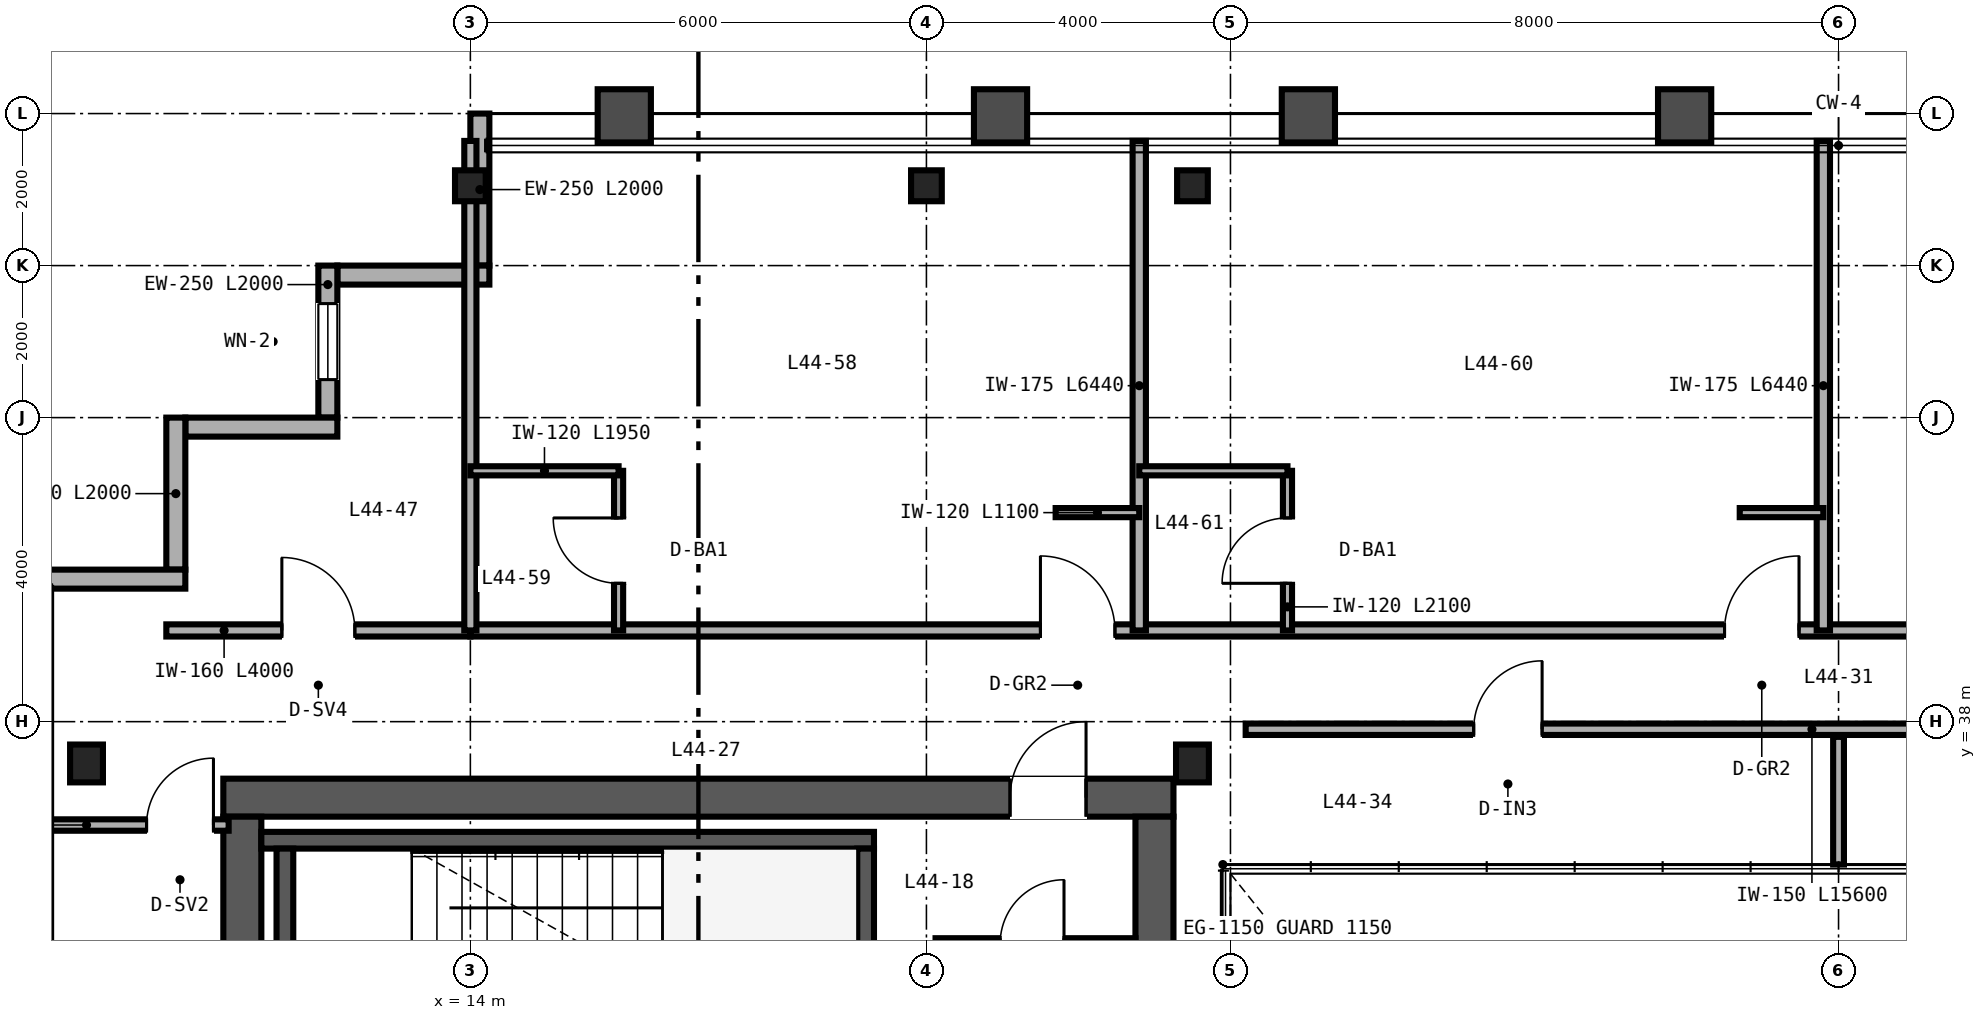
"""IFC4 building model, lengths in metres.
Left out: names, types, materials, properties, quantities, classifications, styles, units other than length and angle.
Written with IfcOpenShell. Run it as: python <this file> out.ifc"""

import sys

from ifc_helpers import new_model, si_unit, direction, frame, frame_2d, origin, origin_2d, place, context, subcontext, project, spatial, rectangle, i_section, extrude, source, transform, mapped, element, fill, save


model = new_model("IFC4")
c1 = context("Model", 3, precision=1e-05, world=origin(), true_north=direction((0.0, 1.0)))
c2 = subcontext(c1, "Body", "Model", "MODEL_VIEW")
j1 = project(units=[si_unit("LENGTHUNIT", "METRE"), si_unit("PLANEANGLEUNIT", "RADIAN")], contexts=[c1])
p1 = place(None, origin())
s1 = spatial("IfcSite", under=j1, at=p1, CompositionType="ELEMENT")
p2 = place(p1, origin())
s2 = spatial("IfcBuilding", under=s1, at=p2, CompositionType="ELEMENT")
p3 = place(p2, frame((0.0, 0.0, 177.6)))
s3 = spatial("IfcBuildingStorey", under=s2, at=p3, CompositionType="ELEMENT", Elevation=177.6)
p4 = place(p3, frame((10.75, 37.0, 0.0), z_axis=(0.0, 0.0, 1.0), x_axis=(1.0, 0.0, 0.0)))
e1 = element("IfcWall", 1, at=p4, inside=s3, PredefinedType="SHEAR", context=c2, shape_type="SweptSolid", body=[
    extrude(rectangle(XDim=12.5, YDim=0.5, at=frame_2d((6.25, 0.0))), origin(), (0.0, 0.0, 1.0), 3.37),
])
p5 = place(p4, frame((10.35, 0.0, 0.0)))
e2 = element("IfcOpeningElement", 2, at=p5, cuts=e1, PredefinedType="OPENING", context=c2, shape_type="SweptSolid", body=[
    extrude(rectangle(XDim=1.0, YDim=2.15, at=frame_2d((0.5, 1.075))), frame((0.0, 0.26, 0.0), z_axis=(0.0, -1.0, 0.0), x_axis=(1.0, 0.0, 0.0)), (0.0, 0.0, 1.0), 0.52),
])
for number, where, z_axis, x_axis in (
    (3, (11.0, 15.25, 0.0), (0.0, 0.0, 1.0), (0.0, 1.0, 0.0)),
    (4, (23.0, 15.25, 0.0), (0.0, 0.0, 1.0), (0.0, 1.0, 0.0)),
):
    element("IfcWall", number, at=place(p3, frame(where, z_axis=z_axis, x_axis=x_axis)), inside=s3, PredefinedType="SHEAR", context=c2, shape_type="SweptSolid", body=[
        extrude(rectangle(XDim=21.5, YDim=0.5, at=frame_2d((10.75, 0.0))), origin(), (0.0, 0.0, 1.0), 3.37),
    ])
p6 = place(p3, frame((11.25, 36.44, 0.0), z_axis=(0.0, 0.0, 1.0), x_axis=(1.0, 0.0, 0.0)))
e5 = element("IfcWall", 5, at=p6, inside=s3, PredefinedType="SHEAR", context=c2, shape_type="SweptSolid", body=[
    extrude(rectangle(XDim=8.06, YDim=0.22, at=frame_2d((4.03, 0.0))), origin(), (0.0, 0.0, 1.0), 3.4),
])
for number, where, z_axis, x_axis in (
    (6, (11.56, 33.05, 0.0), (0.0, 0.0, 1.0), (0.0, 1.0, 0.0)),
    (7, (19.2, 33.05, 0.0), (0.0, 0.0, 1.0), (0.0, 1.0, 0.0)),
):
    element("IfcWall", number, at=place(p3, frame(where, z_axis=z_axis, x_axis=x_axis)), inside=s3, PredefinedType="SHEAR", context=c2, shape_type="SweptSolid", body=[
        extrude(rectangle(XDim=3.28, YDim=0.22, at=frame_2d((1.64, 0.0))), origin(), (0.0, 0.0, 1.0), 3.4),
    ])
m1 = source(origin(), c2, "Body", "SweptSolid", [
    extrude(i_section(OverallWidth=0.432, OverallDepth=0.498, WebThickness=0.056, FlangeThickness=0.089, FilletRadius=0.025, at=origin_2d()), origin(), (0.0, 0.0, 1.0), 3.37),
])
for number, where, z_axis, x_axis in (
    (8, (8.95, 37.45, 0.0), (0.0, 0.0, 1.0), (1.0, 0.0, 0.0)),
    (9, (23.5, 37.45, 0.0), (0.0, 0.0, 1.0), (1.0, 0.0, 0.0)),
):
    element("IfcColumn", number, at=place(p3, frame(where, z_axis=z_axis, x_axis=x_axis)), inside=s3, PredefinedType="COLUMN", context=c2, shape_type="MappedRepresentation", body=[
        mapped(m1, transform((0.0, 0.0, 0.0), scale=1.0)),
    ])
m2 = source(origin(), c2, "Body", "SweptSolid", [
    extrude(i_section(OverallWidth=0.404, OverallDepth=0.407, WebThickness=0.027, FlangeThickness=0.044, FilletRadius=0.025, at=origin_2d()), origin(), (0.0, 0.0, 1.0), 3.37),
])
for number, where, z_axis, x_axis in (
    (10, (14.0, 45.05, 0.0), (0.0, 0.0, 1.0), (1.0, 0.0, 0.0)),
    (11, (20.0, 45.05, 0.0), (0.0, 0.0, 1.0), (1.0, 0.0, 0.0)),
    (12, (23.5, 45.05, 0.0), (0.0, 0.0, 1.0), (1.0, 0.0, 0.0)),
):
    element("IfcColumn", number, at=place(p3, frame(where, z_axis=z_axis, x_axis=x_axis)), inside=s3, PredefinedType="COLUMN", context=c2, shape_type="MappedRepresentation", body=[
        mapped(m2, transform((0.0, 0.0, 0.0), scale=1.0)),
    ])
p7 = place(p3, frame((14.125, 46.0, 0.0), z_axis=(0.0, 0.0, 1.0), x_axis=(0.0, -1.0, 0.0)))
e13 = element("IfcWall", 13, at=p7, inside=s3, PredefinedType="SOLIDWALL", context=c2, shape_type="SweptSolid", body=[
    extrude(rectangle(XDim=2.0, YDim=0.25, at=frame_2d((1.0, 0.0))), origin(), (0.0, 0.0, 1.0), 2.677),
])
p8 = place(p3, frame((14.25, 43.875, 0.0), z_axis=(0.0, 0.0, 1.0), x_axis=(-1.0, 0.0, 0.0)))
e14 = element("IfcWall", 14, at=p8, inside=s3, PredefinedType="SOLIDWALL", context=c2, shape_type="SweptSolid", body=[
    extrude(rectangle(XDim=2.0, YDim=0.25, at=frame_2d((1.0, 0.0))), origin(), (0.0, 0.0, 1.0), 3.37),
])
p9 = place(p3, frame((12.125, 44.0, 0.0), z_axis=(0.0, 0.0, 1.0), x_axis=(0.0, -1.0, 0.0)))
e15 = element("IfcWall", 15, at=p9, inside=s3, PredefinedType="SOLIDWALL", context=c2, shape_type="SweptSolid", body=[
    extrude(rectangle(XDim=2.0, YDim=0.25, at=frame_2d((1.0, 0.0))), origin(), (0.0, 0.0, 1.0), 3.37),
])
p10 = place(p9, frame((0.5, 0.0, 0.85)))
e16 = element("IfcOpeningElement", 16, at=p10, cuts=e15, PredefinedType="OPENING", context=c2, shape_type="SweptSolid", body=[
    extrude(rectangle(XDim=1.0, YDim=1.9, at=frame_2d((0.5, 0.95))), frame((0.0, 0.135, 0.0), z_axis=(0.0, -1.0, 0.0), x_axis=(1.0, 0.0, 0.0)), (0.0, 0.0, 1.0), 0.27),
])
for number, where, z_axis, x_axis in (
    (17, (12.25, 41.875, 0.0), (0.0, 0.0, 1.0), (-1.0, 0.0, 0.0)),
    (18, (10.125, 42.0, 0.0), (0.0, 0.0, 1.0), (0.0, -1.0, 0.0)),
):
    element("IfcWall", number, at=place(p3, frame(where, z_axis=z_axis, x_axis=x_axis)), inside=s3, PredefinedType="SOLIDWALL", context=c2, shape_type="SweptSolid", body=[
        extrude(rectangle(XDim=2.0, YDim=0.25, at=frame_2d((1.0, 0.0))), origin(), (0.0, 0.0, 1.0), 3.37),
    ])
p11 = place(p3, frame((10.25, 39.875, 0.0), z_axis=(0.0, 0.0, 1.0), x_axis=(-1.0, 0.0, 0.0)))
e19 = element("IfcWall", 19, at=p11, inside=s3, PredefinedType="SOLIDWALL", context=c2, shape_type="SweptSolid", body=[
    extrude(rectangle(XDim=2.25, YDim=0.25, at=frame_2d((1.125, 0.0))), origin(), (0.0, 0.0, 1.0), 3.37),
])
p12 = place(p3, frame((20.12, 35.08, 0.0), z_axis=(0.0, 0.0, 1.0), x_axis=(1.0, 0.0, 0.0)))
e20 = element("IfcWall", 20, at=p12, inside=s3, PredefinedType="PARTITIONING", context=c2, shape_type="SweptSolid", body=[
    extrude(rectangle(XDim=2.63, YDim=0.142, at=frame_2d((1.315, 0.0))), origin(), (0.0, 0.0, 1.0), 3.37),
])
p13 = place(p12, frame((0.85, 0.0, 0.0)))
e21 = element("IfcOpeningElement", 21, at=p13, cuts=e20, PredefinedType="OPENING", context=c2, shape_type="SweptSolid", body=[
    extrude(rectangle(XDim=0.84, YDim=2.1, at=frame_2d((0.42, 1.05))), frame((0.0, 0.081, 0.0), z_axis=(0.0, -1.0, 0.0), x_axis=(1.0, 0.0, 0.0)), (0.0, 0.0, 1.0), 0.162),
])
p14 = place(p3, frame((24.2, 37.9, 0.0), z_axis=(0.0, 0.0, 1.0), x_axis=(1.0, 0.0, 0.0)))
e22 = element("IfcWall", 22, at=p14, inside=s3, PredefinedType="PARTITIONING", context=c2, shape_type="SweptSolid", body=[
    extrude(rectangle(XDim=15.6, YDim=0.15, at=frame_2d((7.8, 0.0))), origin(), (0.0, 0.0, 1.0), 3.37),
])
p15 = place(p14, frame((3.0, 0.0, 0.0)))
e23 = element("IfcOpeningElement", 23, at=p15, cuts=e22, PredefinedType="OPENING", context=c2, shape_type="SweptSolid", body=[
    extrude(rectangle(XDim=0.9, YDim=2.15, at=frame_2d((0.45, 1.075))), frame((0.0, 0.085, 0.0), z_axis=(0.0, -1.0, 0.0), x_axis=(1.0, 0.0, 0.0)), (0.0, 0.0, 1.0), 0.17),
])
p16 = place(p14, frame((11.0, 0.0, 0.0)))
e24 = element("IfcOpeningElement", 24, at=p16, cuts=e22, PredefinedType="OPENING", context=c2, shape_type="SweptSolid", body=[
    extrude(rectangle(XDim=0.9, YDim=2.15, at=frame_2d((0.45, 1.075))), frame((0.0, 0.085, 0.0), z_axis=(0.0, -1.0, 0.0), x_axis=(1.0, 0.0, 0.0)), (0.0, 0.0, 1.0), 0.17),
])
p17 = place(p3, frame((32.0, 36.12, 0.0), z_axis=(0.0, 0.0, 1.0), x_axis=(0.0, 1.0, 0.0)))
e25 = element("IfcWall", 25, at=p17, inside=s3, PredefinedType="PARTITIONING", context=c2, shape_type="SweptSolid", body=[
    extrude(rectangle(XDim=1.68, YDim=0.142, at=frame_2d((0.84, 0.0))), origin(), (0.0, 0.0, 1.0), 3.37),
])
p18 = place(p3, frame((8.16, 36.64, 0.0), z_axis=(0.0, 0.0, 1.0), x_axis=(1.0, 0.0, 0.0)))
e26 = element("IfcWall", 26, at=p18, inside=s3, PredefinedType="PARTITIONING", context=c2, shape_type="SweptSolid", body=[
    extrude(rectangle(XDim=2.66, YDim=0.15, at=frame_2d((1.33, 0.0))), origin(), (0.0, 0.0, 1.0), 2.753),
])
p19 = place(p18, frame((1.58, 0.0, 0.0)))
e27 = element("IfcOpeningElement", 27, at=p19, cuts=e26, PredefinedType="OPENING", context=c2, shape_type="SweptSolid", body=[
    extrude(rectangle(XDim=0.88, YDim=2.15, at=frame_2d((0.44, 1.075))), frame((0.0, 0.085, 0.0), z_axis=(0.0, -1.0, 0.0), x_axis=(1.0, 0.0, 0.0)), (0.0, 0.0, 1.0), 0.17),
])
p20 = place(p3, frame((10.0, 39.2, 0.0), z_axis=(0.0, 0.0, 1.0), x_axis=(1.0, 0.0, 0.0)))
e28 = element("IfcWall", 28, at=p20, inside=s3, PredefinedType="PARTITIONING", context=c2, shape_type="SweptSolid", body=[
    extrude(rectangle(XDim=4.0, YDim=0.16, at=frame_2d((2.0, 0.0))), origin(), (0.0, 0.0, 1.0), 3.37),
])
p21 = place(p20, frame((1.52, 0.0, 0.0)))
e29 = element("IfcOpeningElement", 29, at=p21, cuts=e28, PredefinedType="OPENING", context=c2, shape_type="SweptSolid", body=[
    extrude(rectangle(XDim=0.96, YDim=2.15, at=frame_2d((0.48, 1.075))), frame((0.0, 0.09, 0.0), z_axis=(0.0, -1.0, 0.0), x_axis=(1.0, 0.0, 0.0)), (0.0, 0.0, 1.0), 0.18),
])
p22 = place(p3, frame((14.0, 39.2, 0.0), z_axis=(0.0, 0.0, 1.0), x_axis=(1.0, 0.0, 0.0)))
e30 = element("IfcWall", 30, at=p22, inside=s3, PredefinedType="PARTITIONING", context=c2, shape_type="SweptSolid", body=[
    extrude(rectangle(XDim=36.0, YDim=0.16, at=frame_2d((18.0, 0.0))), origin(), (0.0, 0.0, 1.0), 2.913),
])
p23 = place(p22, frame((7.5, 0.0, 0.0)))
e31 = element("IfcOpeningElement", 31, at=p23, cuts=e30, PredefinedType="OPENING", context=c2, shape_type="SweptSolid", body=[
    extrude(rectangle(XDim=0.98, YDim=2.2, at=frame_2d((0.49, 1.1))), frame((0.0, 0.09, 0.0), z_axis=(0.0, -1.0, 0.0), x_axis=(1.0, 0.0, 0.0)), (0.0, 0.0, 1.0), 0.18),
])
p24 = place(p22, frame((16.5, 0.0, 0.0)))
e32 = element("IfcOpeningElement", 32, at=p24, cuts=e30, PredefinedType="OPENING", context=c2, shape_type="SweptSolid", body=[
    extrude(rectangle(XDim=0.98, YDim=2.2, at=frame_2d((0.49, 1.1))), frame((0.0, 0.09, 0.0), z_axis=(0.0, -1.0, 0.0), x_axis=(1.0, 0.0, 0.0)), (0.0, 0.0, 1.0), 0.18),
])
p25 = place(p22, frame((21.82, 0.0, 0.0)))
e33 = element("IfcOpeningElement", 33, at=p25, cuts=e30, PredefinedType="OPENING", context=c2, shape_type="SweptSolid", body=[
    extrude(rectangle(XDim=0.96, YDim=2.15, at=frame_2d((0.48, 1.075))), frame((0.0, 0.09, 0.0), z_axis=(0.0, -1.0, 0.0), x_axis=(1.0, 0.0, 0.0)), (0.0, 0.0, 1.0), 0.18),
])
p26 = place(p22, frame((30.14, 0.0, 0.0)))
e34 = element("IfcOpeningElement", 34, at=p26, cuts=e30, PredefinedType="OPENING", context=c2, shape_type="SweptSolid", body=[
    extrude(rectangle(XDim=0.94, YDim=2.15, at=frame_2d((0.47, 1.075))), frame((0.0, 0.09, 0.0), z_axis=(0.0, -1.0, 0.0), x_axis=(1.0, 0.0, 0.0)), (0.0, 0.0, 1.0), 0.18),
])
p27 = place(p22, frame((34.74, 0.0, 0.0)))
e35 = element("IfcOpeningElement", 35, at=p27, cuts=e30, PredefinedType="OPENING", context=c2, shape_type="SweptSolid", body=[
    extrude(rectangle(XDim=0.94, YDim=2.15, at=frame_2d((0.47, 1.075))), frame((0.0, 0.09, 0.0), z_axis=(0.0, -1.0, 0.0), x_axis=(1.0, 0.0, 0.0)), (0.0, 0.0, 1.0), 0.18),
])
p28 = place(p3, frame((14.0, 39.2, 0.0), z_axis=(0.0, 0.0, 1.0), x_axis=(0.0, 1.0, 0.0)))
e36 = element("IfcWall", 36, at=p28, inside=s3, PredefinedType="PARTITIONING", context=c2, shape_type="SweptSolid", body=[
    extrude(rectangle(XDim=6.44, YDim=0.16, at=frame_2d((3.22, 0.0))), origin(), (0.0, 0.0, 1.0), 2.677),
])
p29 = place(p3, frame((22.8, 39.2, 0.0), z_axis=(0.0, 0.0, 1.0), x_axis=(0.0, 1.0, 0.0)))
e37 = element("IfcWall", 37, at=p29, inside=s3, PredefinedType="PARTITIONING", context=c2, shape_type="SweptSolid", body=[
    extrude(rectangle(XDim=6.44, YDim=0.175, at=frame_2d((3.22, 0.0))), origin(), (0.0, 0.0, 1.0), 2.833),
])
p30 = place(p3, frame((15.95, 39.2, 0.0), z_axis=(0.0, 0.0, 1.0), x_axis=(0.0, 1.0, 0.0)))
e38 = element("IfcWall", 38, at=p30, inside=s3, PredefinedType="PARTITIONING", context=c2, shape_type="SweptSolid", body=[
    extrude(rectangle(XDim=2.1, YDim=0.12, at=frame_2d((1.05, 0.0))), origin(), (0.0, 0.0, 1.0), 3.37),
])
p31 = place(p30, frame((0.62, 0.0, 0.0)))
e39 = element("IfcOpeningElement", 39, at=p31, cuts=e38, PredefinedType="OPENING", context=c2, shape_type="SweptSolid", body=[
    extrude(rectangle(XDim=0.86, YDim=2.1, at=frame_2d((0.43, 1.05))), frame((0.0, 0.07, 0.0), z_axis=(0.0, -1.0, 0.0), x_axis=(1.0, 0.0, 0.0)), (0.0, 0.0, 1.0), 0.14),
])
p32 = place(p3, frame((14.0, 41.3, 0.0), z_axis=(0.0, 0.0, 1.0), x_axis=(1.0, 0.0, 0.0)))
e40 = element("IfcWall", 40, at=p32, inside=s3, PredefinedType="PARTITIONING", context=c2, shape_type="SweptSolid", body=[
    extrude(rectangle(XDim=1.95, YDim=0.12, at=frame_2d((0.975, 0.0))), origin(), (0.0, 0.0, 1.0), 3.37),
])
p33 = place(p3, frame((21.7, 40.75, 0.0), z_axis=(0.0, 0.0, 1.0), x_axis=(1.0, 0.0, 0.0)))
e41 = element("IfcWall", 41, at=p33, inside=s3, PredefinedType="PARTITIONING", context=c2, shape_type="SweptSolid", body=[
    extrude(rectangle(XDim=1.1, YDim=0.12, at=frame_2d((0.55, 0.0))), origin(), (0.0, 0.0, 1.0), 3.37),
])
p34 = place(p3, frame((31.8, 39.2, 0.0), z_axis=(0.0, 0.0, 1.0), x_axis=(0.0, 1.0, 0.0)))
e42 = element("IfcWall", 42, at=p34, inside=s3, PredefinedType="PARTITIONING", context=c2, shape_type="SweptSolid", body=[
    extrude(rectangle(XDim=6.44, YDim=0.175, at=frame_2d((3.22, 0.0))), origin(), (0.0, 0.0, 1.0), 2.443),
])
p35 = place(p3, frame((24.75, 39.2, 0.0), z_axis=(0.0, 0.0, 1.0), x_axis=(0.0, 1.0, 0.0)))
e43 = element("IfcWall", 43, at=p35, inside=s3, PredefinedType="PARTITIONING", context=c2, shape_type="SweptSolid", body=[
    extrude(rectangle(XDim=2.1, YDim=0.12, at=frame_2d((1.05, 0.0))), origin(), (0.0, 0.0, 1.0), 3.37),
])
p36 = place(p35, frame((0.62, 0.0, 0.0)))
e44 = element("IfcOpeningElement", 44, at=p36, cuts=e43, PredefinedType="OPENING", context=c2, shape_type="SweptSolid", body=[
    extrude(rectangle(XDim=0.86, YDim=2.1, at=frame_2d((0.43, 1.05))), frame((0.0, 0.07, 0.0), z_axis=(0.0, -1.0, 0.0), x_axis=(1.0, 0.0, 0.0)), (0.0, 0.0, 1.0), 0.14),
])
p37 = place(p3, frame((22.8, 41.3, 0.0), z_axis=(0.0, 0.0, 1.0), x_axis=(1.0, 0.0, 0.0)))
e45 = element("IfcWall", 45, at=p37, inside=s3, PredefinedType="PARTITIONING", context=c2, shape_type="SweptSolid", body=[
    extrude(rectangle(XDim=1.95, YDim=0.12, at=frame_2d((0.975, 0.0))), origin(), (0.0, 0.0, 1.0), 2.913),
])
p38 = place(p3, frame((30.7, 40.75, 0.0), z_axis=(0.0, 0.0, 1.0), x_axis=(1.0, 0.0, 0.0)))
e46 = element("IfcWall", 46, at=p38, inside=s3, PredefinedType="PARTITIONING", context=c2, shape_type="SweptSolid", body=[
    extrude(rectangle(XDim=1.1, YDim=0.12, at=frame_2d((0.55, 0.0))), origin(), (0.0, 0.0, 1.0), 3.37),
])
m3 = source(origin(), c2, "Body", "SweptSolid", [
    extrude(rectangle(XDim=1.0, YDim=1.9, at=frame_2d((0.5, 0.95))), frame((0.0, 0.03, 0.0), z_axis=(0.0, -1.0, 0.0), x_axis=(1.0, 0.0, 0.0)), (0.0, 0.0, 1.0), 0.06),
])
p39 = place(p10, origin())
e47 = element("IfcWindow", 47, at=p39, inside=s3, PartitioningType="SINGLE_PANEL", PredefinedType="WINDOW", context=c2, shape_type="MappedRepresentation", body=[
    mapped(m3, transform((0.0, 0.0, 0.0), scale=1.0)),
])
fill(e16, e47)
m4 = source(origin(), c2, "Body", "SweptSolid", [
    extrude(rectangle(XDim=1.0, YDim=2.15, at=frame_2d((0.5, 1.075))), frame((0.0, 0.025, 0.0), z_axis=(0.0, -1.0, 0.0), x_axis=(1.0, 0.0, 0.0)), (0.0, 0.0, 1.0), 0.05),
])
p40 = place(p5, origin())
e48 = element("IfcDoor", 48, at=p40, inside=s3, OperationType="SINGLE_SWING_RIGHT", PredefinedType="DOOR", context=c2, shape_type="MappedRepresentation", body=[
    mapped(m4, transform((0.0, 0.0, 0.0), scale=1.0)),
])
fill(e2, e48)
m5 = source(origin(), c2, "Body", "SweptSolid", [
    extrude(rectangle(XDim=0.9, YDim=2.15, at=frame_2d((0.45, 1.075))), frame((0.0, 0.025, 0.0), z_axis=(0.0, -1.0, 0.0), x_axis=(1.0, 0.0, 0.0)), (0.0, 0.0, 1.0), 0.05),
])
p41 = place(p15, origin())
e49 = element("IfcDoor", 49, at=p41, inside=s3, OperationType="SINGLE_SWING_RIGHT", PredefinedType="DOOR", context=c2, shape_type="MappedRepresentation", body=[
    mapped(m5, transform((0.0, 0.0, 0.0), scale=1.0)),
])
fill(e23, e49)
m6 = source(origin(), c2, "Body", "SweptSolid", [
    extrude(rectangle(XDim=0.88, YDim=2.15, at=frame_2d((0.44, 1.075))), frame((0.0, 0.025, 0.0), z_axis=(0.0, -1.0, 0.0), x_axis=(1.0, 0.0, 0.0)), (0.0, 0.0, 1.0), 0.05),
])
p42 = place(p19, origin())
e50 = element("IfcDoor", 50, at=p42, inside=s3, OperationType="SINGLE_SWING_RIGHT", PredefinedType="DOOR", context=c2, shape_type="MappedRepresentation", body=[
    mapped(m6, transform((0.0, 0.0, 0.0), scale=1.0)),
])
fill(e27, e50)
m7 = source(origin(), c2, "Body", "SweptSolid", [
    extrude(rectangle(XDim=0.96, YDim=2.15, at=frame_2d((0.48, 1.075))), frame((0.0, 0.025, 0.0), z_axis=(0.0, -1.0, 0.0), x_axis=(1.0, 0.0, 0.0)), (0.0, 0.0, 1.0), 0.05),
])
p43 = place(p21, origin())
e51 = element("IfcDoor", 51, at=p43, inside=s3, OperationType="SINGLE_SWING_LEFT", PredefinedType="DOOR", context=c2, shape_type="MappedRepresentation", body=[
    mapped(m7, transform((0.0, 0.0, 0.0), scale=1.0)),
])
fill(e29, e51)
m8 = source(origin(), c2, "Body", "SweptSolid", [
    extrude(rectangle(XDim=0.86, YDim=2.1, at=frame_2d((0.43, 1.05))), frame((0.0, 0.025, 0.0), z_axis=(0.0, -1.0, 0.0), x_axis=(1.0, 0.0, 0.0)), (0.0, 0.0, 1.0), 0.05),
])
p44 = place(p31, origin())
e52 = element("IfcDoor", 52, at=p44, inside=s3, OperationType="SINGLE_SWING_RIGHT", PredefinedType="DOOR", context=c2, shape_type="MappedRepresentation", body=[
    mapped(m8, transform((0.0, 0.0, 0.0), scale=1.0)),
])
fill(e39, e52)
p45 = place(p36, origin())
e53 = element("IfcDoor", 53, at=p45, inside=s3, OperationType="SINGLE_SWING_LEFT", PredefinedType="DOOR", context=c2, shape_type="MappedRepresentation", body=[
    mapped(m8, transform((0.0, 0.0, 0.0), scale=1.0)),
])
fill(e44, e53)
m9 = source(origin(), c2, "Body", "SweptSolid", [
    extrude(rectangle(XDim=0.98, YDim=2.2, at=frame_2d((0.49, 1.1))), frame((0.0, 0.025, 0.0), z_axis=(0.0, -1.0, 0.0), x_axis=(1.0, 0.0, 0.0)), (0.0, 0.0, 1.0), 0.05),
])
p46 = place(p23, origin())
e54 = element("IfcDoor", 54, at=p46, inside=s3, OperationType="SINGLE_SWING_LEFT", PredefinedType="DOOR", context=c2, shape_type="MappedRepresentation", body=[
    mapped(m9, transform((0.0, 0.0, 0.0), scale=1.0)),
])
fill(e31, e54)
p47 = place(p24, origin())
e55 = element("IfcDoor", 55, at=p47, inside=s3, OperationType="SINGLE_SWING_RIGHT", PredefinedType="DOOR", context=c2, shape_type="MappedRepresentation", body=[
    mapped(m9, transform((0.0, 0.0, 0.0), scale=1.0)),
])
fill(e32, e55)
save(model, sys.argv[1])
